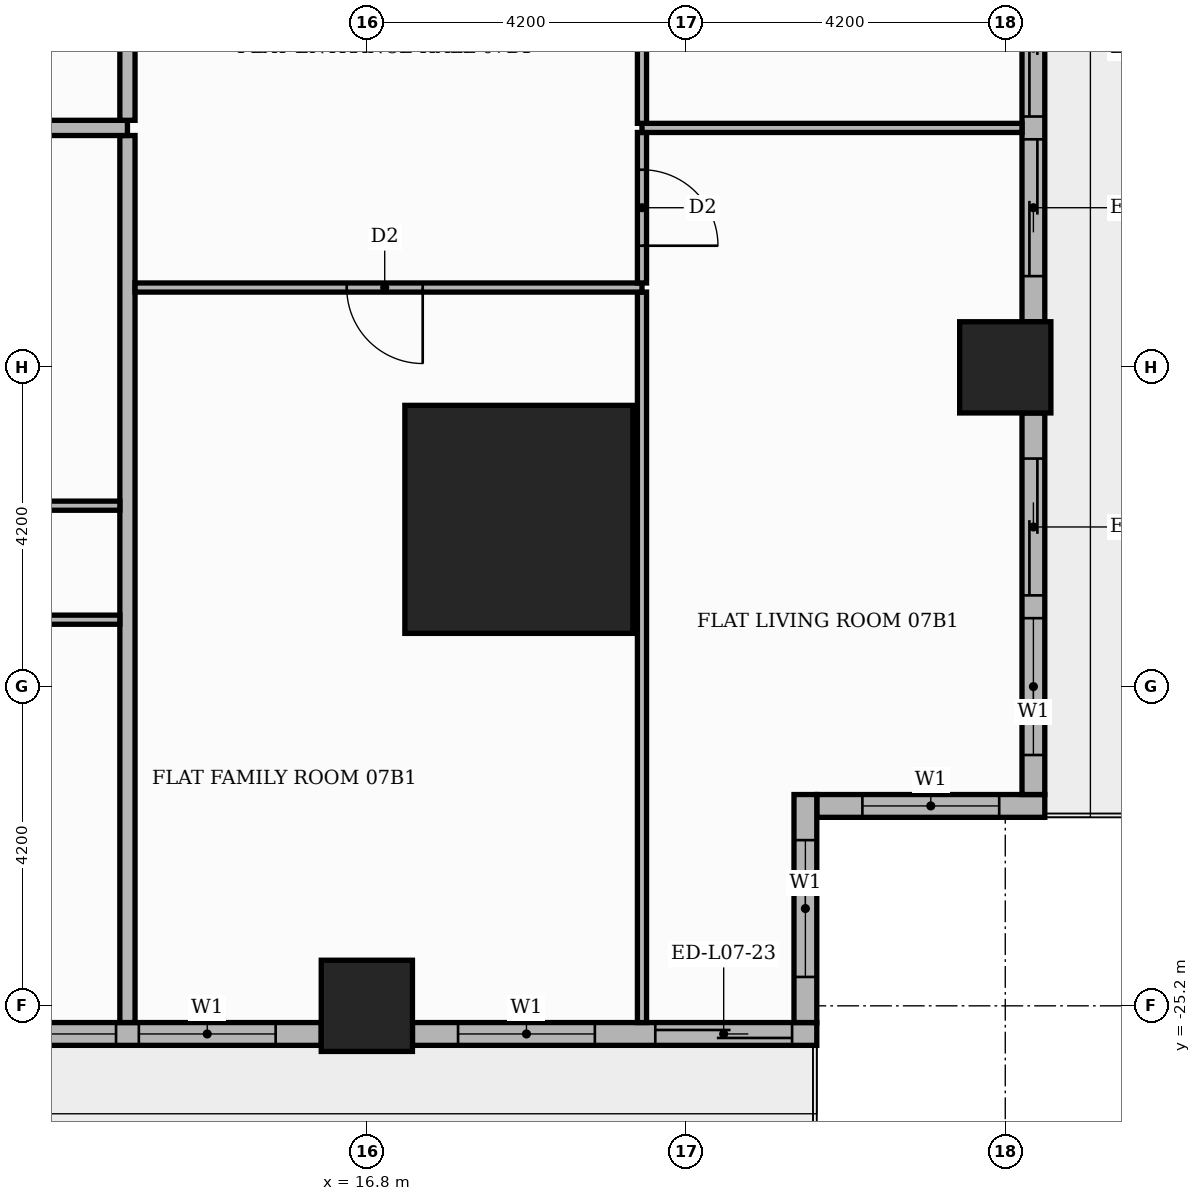
"""IFC4 building model, lengths in metres.
Left out: names, types, materials, properties, quantities, classifications, styles, units other than length and angle.
Written with IfcOpenShell. Run it as: python <this file> out.ifc"""

import sys

from ifc_helpers import new_model, si_unit, direction, frame, frame_2d, origin, origin_2d, place, context, subcontext, project, spatial, rectangle, extrude, element, fill, save


model = new_model("IFC4")
c1 = context("Model", 3, precision=1e-05, world=origin(), true_north=direction((0.0, 1.0)))
c2 = subcontext(c1, "Body", "Model", "MODEL_VIEW")
j1 = project(units=[si_unit("LENGTHUNIT", "METRE"), si_unit("PLANEANGLEUNIT", "RADIAN")], contexts=[c1])
p1 = place(None, origin())
s1 = spatial("IfcSite", under=j1, at=p1, CompositionType="ELEMENT")
p2 = place(p1, origin())
s2 = spatial("IfcBuilding", under=s1, at=p2, CompositionType="ELEMENT")
p3 = place(p2, frame((0.0, 0.0, 34.8)))
s3 = spatial("IfcBuildingStorey", under=s2, at=p3, CompositionType="ELEMENT", Elevation=34.8)
p4 = place(p3, frame((18.8, -18.8, 0.0), z_axis=(0.0, 0.0, 1.0), x_axis=(1.0, 0.0, 0.0)))
e1 = element("IfcColumn", 1, at=p4, inside=s3, PredefinedType="COLUMN", context=c2, shape_type="SweptSolid", body=[
    extrude(rectangle(XDim=3.0, YDim=3.0, at=origin_2d()), origin(), (0.0, 0.0, 1.0), 3.9),
])
for number, where, z_axis, x_axis in (
    (2, (25.2, -16.8, 0.0), (0.0, 0.0, 1.0), (1.0, 0.0, 0.0)),
    (3, (16.8, -25.2, 0.0), (0.0, 0.0, 1.0), (1.0, 0.0, 0.0)),
):
    element("IfcColumn", number, at=place(p3, frame(where, z_axis=z_axis, x_axis=x_axis)), inside=s3, PredefinedType="COLUMN", context=c2, shape_type="SweptSolid", body=[
        extrude(rectangle(XDim=1.2, YDim=1.2, at=origin_2d()), origin(), (0.0, 0.0, 1.0), 3.9),
    ])
p5 = place(p3, frame((22.72, -22.57, 0.0), z_axis=(0.0, 0.0, 1.0), x_axis=(1.0, 0.0, 0.0)))
e4 = element("IfcWall", 4, at=p5, inside=s3, PredefinedType="STANDARD", context=c2, shape_type="SweptSolid", body=[
    extrude(rectangle(XDim=3.0, YDim=0.3, at=frame_2d((1.5, 0.0))), origin(), (0.0, 0.0, 1.0), 3.48),
])
p6 = place(p5, frame((0.6, 0.0, 0.9)))
e5 = element("IfcOpeningElement", 5, at=p6, cuts=e4, PredefinedType="OPENING", context=c2, shape_type="SweptSolid", body=[
    extrude(rectangle(XDim=1.8, YDim=2.1, at=frame_2d((0.9, 1.05))), frame((0.0, 0.16, 0.0), z_axis=(0.0, -1.0, 0.0), x_axis=(1.0, 0.0, 0.0)), (0.0, 0.0, 1.0), 0.32),
])
p7 = place(p3, frame((25.57, -22.42, 0.0), z_axis=(0.0, 0.0, 1.0), x_axis=(0.0, 1.0, 0.0)))
e6 = element("IfcWall", 6, at=p7, inside=s3, PredefinedType="STANDARD", context=c2, shape_type="SweptSolid", body=[
    extrude(rectangle(XDim=5.02, YDim=0.3, at=frame_2d((2.51, 0.0))), origin(), (0.0, 0.0, 1.0), 3.48),
])
p8 = place(p7, frame((0.52, 0.0, 0.9)))
e7 = element("IfcOpeningElement", 7, at=p8, cuts=e6, PredefinedType="OPENING", context=c2, shape_type="SweptSolid", body=[
    extrude(rectangle(XDim=1.8, YDim=2.1, at=frame_2d((0.9, 1.05))), frame((0.0, 0.16, 0.0), z_axis=(0.0, -1.0, 0.0), x_axis=(1.0, 0.0, 0.0)), (0.0, 0.0, 1.0), 0.32),
])
p9 = place(p7, frame((2.62, 0.0, 0.0)))
e8 = element("IfcOpeningElement", 8, at=p9, cuts=e6, PredefinedType="OPENING", context=c2, shape_type="SweptSolid", body=[
    extrude(rectangle(XDim=1.8, YDim=2.4, at=frame_2d((0.9, 1.2))), frame((0.0, 0.16, 0.0), z_axis=(0.0, -1.0, 0.0), x_axis=(1.0, 0.0, 0.0)), (0.0, 0.0, 1.0), 0.32),
])
p10 = place(p3, frame((25.57, -16.2, 0.0), z_axis=(0.0, 0.0, 1.0), x_axis=(0.0, 1.0, 0.0)))
e9 = element("IfcWall", 9, at=p10, inside=s3, PredefinedType="STANDARD", context=c2, shape_type="SweptSolid", body=[
    extrude(rectangle(XDim=7.2, YDim=0.3, at=frame_2d((3.6, 0.0))), origin(), (0.0, 0.0, 1.0), 3.48),
])
p11 = place(p10, frame((0.6, 0.0, 0.0)))
e10 = element("IfcOpeningElement", 10, at=p11, cuts=e9, PredefinedType="OPENING", context=c2, shape_type="SweptSolid", body=[
    extrude(rectangle(XDim=1.8, YDim=2.4, at=frame_2d((0.9, 1.2))), frame((0.0, 0.16, 0.0), z_axis=(0.0, -1.0, 0.0), x_axis=(1.0, 0.0, 0.0)), (0.0, 0.0, 1.0), 0.32),
])
p12 = place(p10, frame((2.7, 0.0, 0.0)))
e11 = element("IfcOpeningElement", 11, at=p12, cuts=e9, PredefinedType="OPENING", context=c2, shape_type="SweptSolid", body=[
    extrude(rectangle(XDim=1.8, YDim=2.4, at=frame_2d((0.9, 1.2))), frame((0.0, 0.16, 0.0), z_axis=(0.0, -1.0, 0.0), x_axis=(1.0, 0.0, 0.0)), (0.0, 0.0, 1.0), 0.32),
])
p13 = place(p10, frame((4.8, 0.0, 0.9)))
e12 = element("IfcOpeningElement", 12, at=p13, cuts=e9, PredefinedType="OPENING", context=c2, shape_type="SweptSolid", body=[
    extrude(rectangle(XDim=1.8, YDim=2.1, at=frame_2d((0.9, 1.05))), frame((0.0, 0.16, 0.0), z_axis=(0.0, -1.0, 0.0), x_axis=(1.0, 0.0, 0.0)), (0.0, 0.0, 1.0), 0.32),
])
p14 = place(p3, frame((9.0, -25.57, 0.0), z_axis=(0.0, 0.0, 1.0), x_axis=(1.0, 0.0, 0.0)))
e13 = element("IfcWall", 13, at=p14, inside=s3, PredefinedType="STANDARD", context=c2, shape_type="SweptSolid", body=[
    extrude(rectangle(XDim=7.2, YDim=0.3, at=frame_2d((3.6, 0.0))), origin(), (0.0, 0.0, 1.0), 3.48),
])
p15 = place(p14, frame((0.6, 0.0, 0.9)))
e14 = element("IfcOpeningElement", 14, at=p15, cuts=e13, PredefinedType="OPENING", context=c2, shape_type="SweptSolid", body=[
    extrude(rectangle(XDim=3.9, YDim=2.1, at=frame_2d((1.95, 1.05))), frame((0.0, 0.16, 0.0), z_axis=(0.0, -1.0, 0.0), x_axis=(1.0, 0.0, 0.0)), (0.0, 0.0, 1.0), 0.32),
])
p16 = place(p14, frame((4.8, 0.0, 0.9)))
e15 = element("IfcOpeningElement", 15, at=p16, cuts=e13, PredefinedType="OPENING", context=c2, shape_type="SweptSolid", body=[
    extrude(rectangle(XDim=1.8, YDim=2.1, at=frame_2d((0.9, 1.05))), frame((0.0, 0.16, 0.0), z_axis=(0.0, -1.0, 0.0), x_axis=(1.0, 0.0, 0.0)), (0.0, 0.0, 1.0), 0.32),
])
p17 = place(p3, frame((17.4, -25.57, 0.0), z_axis=(0.0, 0.0, 1.0), x_axis=(1.0, 0.0, 0.0)))
e16 = element("IfcWall", 16, at=p17, inside=s3, PredefinedType="STANDARD", context=c2, shape_type="SweptSolid", body=[
    extrude(rectangle(XDim=5.32, YDim=0.3, at=frame_2d((2.66, 0.0))), origin(), (0.0, 0.0, 1.0), 3.48),
])
p18 = place(p17, frame((0.6, 0.0, 0.9)))
e17 = element("IfcOpeningElement", 17, at=p18, cuts=e16, PredefinedType="OPENING", context=c2, shape_type="SweptSolid", body=[
    extrude(rectangle(XDim=1.8, YDim=2.1, at=frame_2d((0.9, 1.05))), frame((0.0, 0.16, 0.0), z_axis=(0.0, -1.0, 0.0), x_axis=(1.0, 0.0, 0.0)), (0.0, 0.0, 1.0), 0.32),
])
p19 = place(p17, frame((3.195, 0.0, 0.0)))
e18 = element("IfcOpeningElement", 18, at=p19, cuts=e16, PredefinedType="OPENING", context=c2, shape_type="SweptSolid", body=[
    extrude(rectangle(XDim=1.8, YDim=2.4, at=frame_2d((0.9, 1.2))), frame((0.0, 0.16, 0.0), z_axis=(0.0, -1.0, 0.0), x_axis=(1.0, 0.0, 0.0)), (0.0, 0.0, 1.0), 0.32),
])
p20 = place(p3, frame((22.57, -25.42, 0.0), z_axis=(0.0, 0.0, 1.0), x_axis=(0.0, 1.0, 0.0)))
e19 = element("IfcWall", 19, at=p20, inside=s3, PredefinedType="STANDARD", context=c2, shape_type="SweptSolid", body=[
    extrude(rectangle(XDim=3.0, YDim=0.3, at=frame_2d((1.5, 0.0))), origin(), (0.0, 0.0, 1.0), 3.48),
])
p21 = place(p20, frame((0.6, 0.0, 0.9)))
e20 = element("IfcOpeningElement", 20, at=p21, cuts=e19, PredefinedType="OPENING", context=c2, shape_type="SweptSolid", body=[
    extrude(rectangle(XDim=1.8, YDim=2.1, at=frame_2d((0.9, 1.05))), frame((0.0, 0.16, 0.0), z_axis=(0.0, -1.0, 0.0), x_axis=(1.0, 0.0, 0.0)), (0.0, 0.0, 1.0), 0.32),
])
p22 = place(p3, frame((13.65, -25.42, 0.0), z_axis=(0.0, 0.0, 1.0), x_axis=(0.0, 1.0, 0.0)))
e21 = element("IfcWall", 21, at=p22, inside=s3, PredefinedType="PARTITIONING", context=c2, shape_type="SweptSolid", body=[
    extrude(rectangle(XDim=11.67, YDim=0.2, at=frame_2d((5.835, 0.0))), origin(), (0.0, 0.0, 1.0), 3.48),
])
p23 = place(p3, frame((20.42, -25.42, 0.0), z_axis=(0.0, 0.0, 1.0), x_axis=(0.0, 1.0, 0.0)))
e22 = element("IfcWall", 22, at=p23, inside=s3, PredefinedType="PARTITIONING", context=c2, shape_type="SweptSolid", body=[
    extrude(rectangle(XDim=9.61, YDim=0.12, at=frame_2d((4.805, 0.0))), origin(), (0.0, 0.0, 1.0), 3.48),
])
p24 = place(p3, frame((5.25, -20.12, 0.0), z_axis=(0.0, 0.0, 1.0), x_axis=(1.0, 0.0, 0.0)))
e23 = element("IfcWall", 23, at=p24, inside=s3, PredefinedType="PARTITIONING", context=c2, shape_type="SweptSolid", body=[
    extrude(rectangle(XDim=8.3, YDim=0.12, at=frame_2d((4.15, 0.0))), origin(), (0.0, 0.0, 1.0), 3.48),
])
p25 = place(p24, frame((3.75, 0.0, 0.0)))
e24 = element("IfcOpeningElement", 24, at=p25, cuts=e23, PredefinedType="OPENING", context=c2, shape_type="SweptSolid", body=[
    extrude(rectangle(XDim=0.9, YDim=2.1, at=frame_2d((0.45, 1.05))), frame((0.0, 0.07, 0.0), z_axis=(0.0, -1.0, 0.0), x_axis=(1.0, 0.0, 0.0)), (0.0, 0.0, 1.0), 0.14),
])
p26 = place(p3, frame((-7.35, -18.62, 0.0), z_axis=(0.0, 0.0, 1.0), x_axis=(1.0, 0.0, 0.0)))
e25 = element("IfcWall", 25, at=p26, inside=s3, PredefinedType="PARTITIONING", context=c2, shape_type="SweptSolid", body=[
    extrude(rectangle(XDim=20.9, YDim=0.12, at=frame_2d((10.45, 0.0))), origin(), (0.0, 0.0, 1.0), 3.48),
])
p27 = place(p26, frame((2.7, 0.0, 0.0)))
e26 = element("IfcOpeningElement", 26, at=p27, cuts=e25, PredefinedType="OPENING", context=c2, shape_type="SweptSolid", body=[
    extrude(rectangle(XDim=0.9, YDim=2.1, at=frame_2d((0.45, 1.05))), frame((0.0, 0.07, 0.0), z_axis=(0.0, -1.0, 0.0), x_axis=(1.0, 0.0, 0.0)), (0.0, 0.0, 1.0), 0.14),
])
p28 = place(p26, frame((7.95, 0.0, 0.0)))
e27 = element("IfcOpeningElement", 27, at=p28, cuts=e25, PredefinedType="OPENING", context=c2, shape_type="SweptSolid", body=[
    extrude(rectangle(XDim=0.9, YDim=2.1, at=frame_2d((0.45, 1.05))), frame((0.0, 0.07, 0.0), z_axis=(0.0, -1.0, 0.0), x_axis=(1.0, 0.0, 0.0)), (0.0, 0.0, 1.0), 0.14),
])
p29 = place(p26, frame((11.1, 0.0, 0.0)))
e28 = element("IfcOpeningElement", 28, at=p29, cuts=e25, PredefinedType="OPENING", context=c2, shape_type="SweptSolid", body=[
    extrude(rectangle(XDim=0.9, YDim=2.1, at=frame_2d((0.45, 1.05))), frame((0.0, 0.07, 0.0), z_axis=(0.0, -1.0, 0.0), x_axis=(1.0, 0.0, 0.0)), (0.0, 0.0, 1.0), 0.14),
])
p30 = place(p26, frame((13.275, 0.0, 0.0)))
e29 = element("IfcOpeningElement", 29, at=p30, cuts=e25, PredefinedType="OPENING", context=c2, shape_type="SweptSolid", body=[
    extrude(rectangle(XDim=0.9, YDim=2.1, at=frame_2d((0.45, 1.05))), frame((0.0, 0.07, 0.0), z_axis=(0.0, -1.0, 0.0), x_axis=(1.0, 0.0, 0.0)), (0.0, 0.0, 1.0), 0.14),
])
p31 = place(p26, frame((15.3, 0.0, 0.0)))
e30 = element("IfcOpeningElement", 30, at=p31, cuts=e25, PredefinedType="OPENING", context=c2, shape_type="SweptSolid", body=[
    extrude(rectangle(XDim=0.9, YDim=2.1, at=frame_2d((0.45, 1.05))), frame((0.0, 0.07, 0.0), z_axis=(0.0, -1.0, 0.0), x_axis=(1.0, 0.0, 0.0)), (0.0, 0.0, 1.0), 0.14),
])
p32 = place(p26, frame((18.375, 0.0, 0.0)))
e31 = element("IfcOpeningElement", 31, at=p32, cuts=e25, PredefinedType="OPENING", context=c2, shape_type="SweptSolid", body=[
    extrude(rectangle(XDim=0.9, YDim=2.1, at=frame_2d((0.45, 1.05))), frame((0.0, 0.07, 0.0), z_axis=(0.0, -1.0, 0.0), x_axis=(1.0, 0.0, 0.0)), (0.0, 0.0, 1.0), 0.14),
])
p33 = place(p3, frame((13.75, -15.75, 0.0), z_axis=(0.0, 0.0, 1.0), x_axis=(1.0, 0.0, 0.0)))
e32 = element("IfcWall", 32, at=p33, inside=s3, PredefinedType="PARTITIONING", context=c2, shape_type="SweptSolid", body=[
    extrude(rectangle(XDim=6.67, YDim=0.12, at=frame_2d((3.335, 0.0))), origin(), (0.0, 0.0, 1.0), 3.48),
])
p34 = place(p33, frame((2.785, 0.0, 0.0)))
e33 = element("IfcOpeningElement", 33, at=p34, cuts=e32, PredefinedType="OPENING", context=c2, shape_type="SweptSolid", body=[
    extrude(rectangle(XDim=1.0, YDim=2.1, at=frame_2d((0.5, 1.05))), frame((0.0, 0.07, 0.0), z_axis=(0.0, -1.0, 0.0), x_axis=(1.0, 0.0, 0.0)), (0.0, 0.0, 1.0), 0.14),
])
p35 = place(p3, frame((20.42, -15.69, 0.0), z_axis=(0.0, 0.0, 1.0), x_axis=(0.0, 1.0, 0.0)))
e34 = element("IfcWall", 34, at=p35, inside=s3, PredefinedType="PARTITIONING", context=c2, shape_type="SweptSolid", body=[
    extrude(rectangle(XDim=1.98, YDim=0.12, at=frame_2d((0.99, 0.0))), origin(), (0.0, 0.0, 1.0), 3.48),
])
p36 = place(p35, frame((0.49, 0.0, 0.0)))
e35 = element("IfcOpeningElement", 35, at=p36, cuts=e34, PredefinedType="OPENING", context=c2, shape_type="SweptSolid", body=[
    extrude(rectangle(XDim=1.0, YDim=2.1, at=frame_2d((0.5, 1.05))), frame((0.0, 0.07, 0.0), z_axis=(0.0, -1.0, 0.0), x_axis=(1.0, 0.0, 0.0)), (0.0, 0.0, 1.0), 0.14),
])
p37 = place(p3, frame((-25.42, -13.65, 0.0), z_axis=(0.0, 0.0, 1.0), x_axis=(1.0, 0.0, 0.0)))
e36 = element("IfcWall", 36, at=p37, inside=s3, PredefinedType="PARTITIONING", context=c2, shape_type="SweptSolid", body=[
    extrude(rectangle(XDim=39.07, YDim=0.2, at=frame_2d((19.535, 0.0))), origin(), (0.0, 0.0, 1.0), 3.48),
])
p38 = place(p37, frame((14.37, 0.0, 0.0)))
e37 = element("IfcOpeningElement", 37, at=p38, cuts=e36, PredefinedType="OPENING", context=c2, shape_type="SweptSolid", body=[
    extrude(rectangle(XDim=1.1, YDim=2.4, at=frame_2d((0.55, 1.2))), frame((0.0, 0.11, 0.0), z_axis=(0.0, -1.0, 0.0), x_axis=(1.0, 0.0, 0.0)), (0.0, 0.0, 1.0), 0.22),
])
p39 = place(p3, frame((20.42, -13.65, 0.0), z_axis=(0.0, 0.0, 1.0), x_axis=(1.0, 0.0, 0.0)))
e38 = element("IfcWall", 38, at=p39, inside=s3, PredefinedType="PARTITIONING", context=c2, shape_type="SweptSolid", body=[
    extrude(rectangle(XDim=5.0, YDim=0.12, at=frame_2d((2.5, 0.0))), origin(), (0.0, 0.0, 1.0), 3.48),
])
p40 = place(p3, frame((20.42, -13.59, 0.0), z_axis=(0.0, 0.0, 1.0), x_axis=(0.0, 1.0, 0.0)))
e39 = element("IfcWall", 39, at=p40, inside=s3, PredefinedType="PARTITIONING", context=c2, shape_type="SweptSolid", body=[
    extrude(rectangle(XDim=4.08, YDim=0.12, at=frame_2d((2.04, 0.0))), origin(), (0.0, 0.0, 1.0), 3.48),
])
p41 = place(p40, frame((1.59, 0.0, 0.0)))
e40 = element("IfcOpeningElement", 40, at=p41, cuts=e39, PredefinedType="OPENING", context=c2, shape_type="SweptSolid", body=[
    extrude(rectangle(XDim=0.9, YDim=2.1, at=frame_2d((0.45, 1.05))), frame((0.0, 0.07, 0.0), z_axis=(0.0, -1.0, 0.0), x_axis=(1.0, 0.0, 0.0)), (0.0, 0.0, 1.0), 0.14),
])
p42 = place(p3, frame((13.65, -13.55, 0.0), z_axis=(0.0, 0.0, 1.0), x_axis=(0.0, 1.0, 0.0)))
e41 = element("IfcWall", 41, at=p42, inside=s3, PredefinedType="PARTITIONING", context=c2, shape_type="SweptSolid", body=[
    extrude(rectangle(XDim=8.2, YDim=0.2, at=frame_2d((4.1, 0.0))), origin(), (0.0, 0.0, 1.0), 3.48),
])
p43 = place(p42, frame((1.45, 0.0, 0.0)))
e42 = element("IfcOpeningElement", 42, at=p43, cuts=e41, PredefinedType="OPENING", context=c2, shape_type="SweptSolid", body=[
    extrude(rectangle(XDim=1.1, YDim=2.4, at=frame_2d((0.55, 1.2))), frame((0.0, 0.11, 0.0), z_axis=(0.0, -1.0, 0.0), x_axis=(1.0, 0.0, 0.0)), (0.0, 0.0, 1.0), 0.22),
])
p44 = place(p6, origin())
e43 = element("IfcWindow", 43, at=p44, inside=s3, PartitioningType="SINGLE_PANEL", PredefinedType="WINDOW", context=c2, shape_type="SweptSolid", body=[
    extrude(rectangle(XDim=1.8, YDim=2.1, at=frame_2d((0.9, 1.05))), frame((0.0, 0.03, 0.0), z_axis=(0.0, -1.0, 0.0), x_axis=(1.0, 0.0, 0.0)), (0.0, 0.0, 1.0), 0.06),
])
fill(e5, e43)
p45 = place(p8, origin())
e44 = element("IfcWindow", 44, at=p45, inside=s3, PartitioningType="SINGLE_PANEL", PredefinedType="WINDOW", context=c2, shape_type="SweptSolid", body=[
    extrude(rectangle(XDim=1.8, YDim=2.1, at=frame_2d((0.9, 1.05))), frame((0.0, 0.03, 0.0), z_axis=(0.0, -1.0, 0.0), x_axis=(1.0, 0.0, 0.0)), (0.0, 0.0, 1.0), 0.06),
])
fill(e7, e44)
p46 = place(p9, origin())
e45 = element("IfcDoor", 45, at=p46, inside=s3, OperationType="SLIDING_TO_RIGHT", PredefinedType="DOOR", context=c2, shape_type="SweptSolid", body=[
    extrude(rectangle(XDim=1.8, YDim=2.4, at=frame_2d((0.9, 1.2))), frame((0.0, 0.025, 0.0), z_axis=(0.0, -1.0, 0.0), x_axis=(1.0, 0.0, 0.0)), (0.0, 0.0, 1.0), 0.05),
])
fill(e8, e45)
p47 = place(p11, origin())
e46 = element("IfcDoor", 46, at=p47, inside=s3, OperationType="SLIDING_TO_LEFT", PredefinedType="DOOR", context=c2, shape_type="SweptSolid", body=[
    extrude(rectangle(XDim=1.8, YDim=2.4, at=frame_2d((0.9, 1.2))), frame((0.0, 0.025, 0.0), z_axis=(0.0, -1.0, 0.0), x_axis=(1.0, 0.0, 0.0)), (0.0, 0.0, 1.0), 0.05),
])
fill(e10, e46)
p48 = place(p12, origin())
e47 = element("IfcDoor", 47, at=p48, inside=s3, OperationType="SLIDING_TO_RIGHT", PredefinedType="DOOR", context=c2, shape_type="SweptSolid", body=[
    extrude(rectangle(XDim=1.8, YDim=2.4, at=frame_2d((0.9, 1.2))), frame((0.0, 0.025, 0.0), z_axis=(0.0, -1.0, 0.0), x_axis=(1.0, 0.0, 0.0)), (0.0, 0.0, 1.0), 0.05),
])
fill(e11, e47)
p49 = place(p15, origin())
e48 = element("IfcWindow", 48, at=p49, inside=s3, PartitioningType="SINGLE_PANEL", PredefinedType="WINDOW", context=c2, shape_type="SweptSolid", body=[
    extrude(rectangle(XDim=3.9, YDim=2.1, at=frame_2d((1.95, 1.05))), frame((0.0, 0.03, 0.0), z_axis=(0.0, -1.0, 0.0), x_axis=(1.0, 0.0, 0.0)), (0.0, 0.0, 1.0), 0.06),
])
fill(e14, e48)
p50 = place(p16, origin())
e49 = element("IfcWindow", 49, at=p50, inside=s3, PartitioningType="SINGLE_PANEL", PredefinedType="WINDOW", context=c2, shape_type="SweptSolid", body=[
    extrude(rectangle(XDim=1.8, YDim=2.1, at=frame_2d((0.9, 1.05))), frame((0.0, 0.03, 0.0), z_axis=(0.0, -1.0, 0.0), x_axis=(1.0, 0.0, 0.0)), (0.0, 0.0, 1.0), 0.06),
])
fill(e15, e49)
p51 = place(p18, origin())
e50 = element("IfcWindow", 50, at=p51, inside=s3, PartitioningType="SINGLE_PANEL", PredefinedType="WINDOW", context=c2, shape_type="SweptSolid", body=[
    extrude(rectangle(XDim=1.8, YDim=2.1, at=frame_2d((0.9, 1.05))), frame((0.0, 0.03, 0.0), z_axis=(0.0, -1.0, 0.0), x_axis=(1.0, 0.0, 0.0)), (0.0, 0.0, 1.0), 0.06),
])
fill(e17, e50)
p52 = place(p19, origin())
e51 = element("IfcDoor", 51, at=p52, inside=s3, OperationType="SLIDING_TO_RIGHT", PredefinedType="DOOR", context=c2, shape_type="SweptSolid", body=[
    extrude(rectangle(XDim=1.8, YDim=2.4, at=frame_2d((0.9, 1.2))), frame((0.0, 0.025, 0.0), z_axis=(0.0, -1.0, 0.0), x_axis=(1.0, 0.0, 0.0)), (0.0, 0.0, 1.0), 0.05),
])
fill(e18, e51)
p53 = place(p21, origin())
e52 = element("IfcWindow", 52, at=p53, inside=s3, PartitioningType="SINGLE_PANEL", PredefinedType="WINDOW", context=c2, shape_type="SweptSolid", body=[
    extrude(rectangle(XDim=1.8, YDim=2.1, at=frame_2d((0.9, 1.05))), frame((0.0, 0.03, 0.0), z_axis=(0.0, -1.0, 0.0), x_axis=(1.0, 0.0, 0.0)), (0.0, 0.0, 1.0), 0.06),
])
fill(e20, e52)
p54 = place(p34, frame((1.0, 0.0, 0.0), z_axis=(0.0, 0.0, 1.0), x_axis=(-1.0, 0.0, 0.0)))
e53 = element("IfcDoor", 53, at=p54, inside=s3, OperationType="SINGLE_SWING_RIGHT", PredefinedType="DOOR", context=c2, shape_type="SweptSolid", body=[
    extrude(rectangle(XDim=1.0, YDim=2.1, at=frame_2d((0.5, 1.05))), frame((0.0, 0.025, 0.0), z_axis=(0.0, -1.0, 0.0), x_axis=(1.0, 0.0, 0.0)), (0.0, 0.0, 1.0), 0.05),
])
fill(e33, e53)
p55 = place(p36, frame((1.0, 0.0, 0.0), z_axis=(0.0, 0.0, 1.0), x_axis=(-1.0, 0.0, 0.0)))
e54 = element("IfcDoor", 54, at=p55, inside=s3, OperationType="SINGLE_SWING_LEFT", PredefinedType="DOOR", context=c2, shape_type="SweptSolid", body=[
    extrude(rectangle(XDim=1.0, YDim=2.1, at=frame_2d((0.5, 1.05))), frame((0.0, 0.025, 0.0), z_axis=(0.0, -1.0, 0.0), x_axis=(1.0, 0.0, 0.0)), (0.0, 0.0, 1.0), 0.05),
])
fill(e35, e54)
save(model, sys.argv[1])
